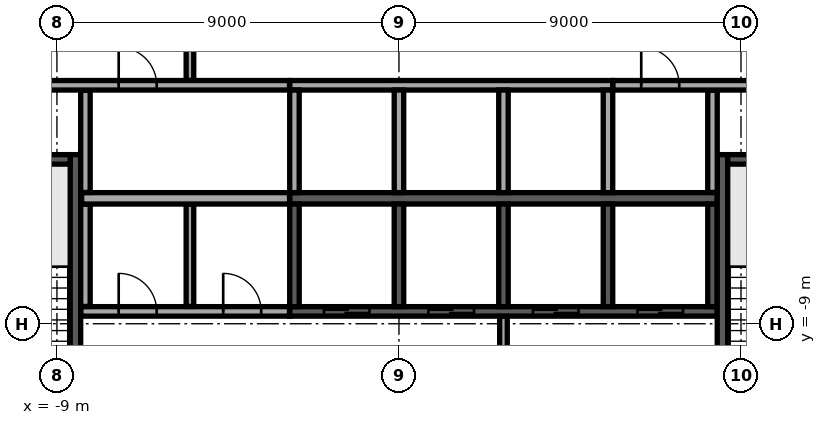
"""IFC4 building model, lengths in metres.
Left out: names, types, materials, properties, quantities, classifications, styles, units other than length and angle.
Written with IfcOpenShell. Run it as: python <this file> out.ifc"""

import sys

from ifc_helpers import new_model, si_unit, direction, frame, frame_2d, origin, place, context, subcontext, project, spatial, rectangle, extrude, element, fill, save


model = new_model("IFC4")
c1 = context("Model", 3, precision=1e-05, world=origin(), true_north=direction((0.0, 1.0)))
c2 = subcontext(c1, "Body", "Model", "MODEL_VIEW")
j1 = project(units=[si_unit("LENGTHUNIT", "METRE"), si_unit("PLANEANGLEUNIT", "RADIAN")], contexts=[c1])
p1 = place(None, origin())
s1 = spatial("IfcSite", under=j1, at=p1, CompositionType="ELEMENT")
p2 = place(p1, origin())
s2 = spatial("IfcBuilding", under=s1, at=p2, CompositionType="ELEMENT")
p3 = place(p2, frame((0.0, 0.0, 193.3)))
s3 = spatial("IfcBuildingStorey", under=s2, at=p3, CompositionType="ELEMENT", Elevation=193.3)
p4 = place(p3, frame((-2.875, -5.7, 0.0), z_axis=(0.0, 0.0, 1.0), x_axis=(1.0, 0.0, 0.0)))
e1 = element("IfcWall", 1, at=p4, inside=s3, PredefinedType="SOLIDWALL", context=c2, shape_type="SweptSolid", body=[
    extrude(rectangle(XDim=11.25, YDim=0.3, at=frame_2d((5.625, 0.0))), origin(), (0.0, 0.0, 1.0), 3.62),
])
p5 = place(p3, frame((-2.875, -2.725, 0.0), z_axis=(0.0, 0.0, 1.0), x_axis=(1.0, 0.0, 0.0)))
e2 = element("IfcWall", 2, at=p5, inside=s3, PredefinedType="SOLIDWALL", context=c2, shape_type="SweptSolid", body=[
    extrude(rectangle(XDim=8.5, YDim=0.25, at=frame_2d((4.25, 0.0))), origin(), (0.0, 0.0, 1.0), 3.62),
])
for number, where, z_axis, x_axis in (
    (3, (-2.75, -5.55, 0.0), (0.0, 0.0, 1.0), (0.0, 1.0, 0.0)),
    (4, (0.0, -5.55, 0.0), (0.0, 0.0, 1.0), (0.0, 1.0, 0.0)),
    (5, (2.75, -5.55, 0.0), (0.0, 0.0, 1.0), (0.0, 1.0, 0.0)),
    (6, (5.5, -5.55, 0.0), (0.0, 0.0, 1.0), (0.0, 1.0, 0.0)),
):
    element("IfcWall", number, at=place(p3, frame(where, z_axis=z_axis, x_axis=x_axis)), inside=s3, PredefinedType="SOLIDWALL", context=c2, shape_type="SweptSolid", body=[
        extrude(rectangle(XDim=2.7, YDim=0.25, at=frame_2d((1.35, 0.0))), origin(), (0.0, 0.0, 1.0), 3.62),
    ])
p6 = place(p3, frame((-2.875, -8.675, 0.0), z_axis=(0.0, 0.0, 1.0), x_axis=(1.0, 0.0, 0.0)))
e7 = element("IfcWall", 7, at=p6, inside=s3, PredefinedType="SOLIDWALL", context=c2, shape_type="SweptSolid", body=[
    extrude(rectangle(XDim=11.25, YDim=0.25, at=frame_2d((5.625, 0.0))), origin(), (0.0, 0.0, 1.0), 3.62),
])
p7 = place(p6, frame((0.9, 0.0, 0.0)))
e8 = element("IfcOpeningElement", 8, at=p7, cuts=e7, PredefinedType="OPENING", context=c2, shape_type="SweptSolid", body=[
    extrude(rectangle(XDim=1.2, YDim=2.1, at=frame_2d((0.6, 1.05))), frame((0.0, 0.135, 0.0), z_axis=(0.0, -1.0, 0.0), x_axis=(1.0, 0.0, 0.0)), (0.0, 0.0, 1.0), 0.27),
])
p8 = place(p6, frame((3.65, 0.0, 0.0)))
e9 = element("IfcOpeningElement", 9, at=p8, cuts=e7, PredefinedType="OPENING", context=c2, shape_type="SweptSolid", body=[
    extrude(rectangle(XDim=1.2, YDim=2.1, at=frame_2d((0.6, 1.05))), frame((0.0, 0.135, 0.0), z_axis=(0.0, -1.0, 0.0), x_axis=(1.0, 0.0, 0.0)), (0.0, 0.0, 1.0), 0.27),
])
p9 = place(p6, frame((6.4, 0.0, 0.0)))
e10 = element("IfcOpeningElement", 10, at=p9, cuts=e7, PredefinedType="OPENING", context=c2, shape_type="SweptSolid", body=[
    extrude(rectangle(XDim=1.2, YDim=2.1, at=frame_2d((0.6, 1.05))), frame((0.0, 0.135, 0.0), z_axis=(0.0, -1.0, 0.0), x_axis=(1.0, 0.0, 0.0)), (0.0, 0.0, 1.0), 0.27),
])
p10 = place(p6, frame((9.15, 0.0, 0.0)))
e11 = element("IfcOpeningElement", 11, at=p10, cuts=e7, PredefinedType="OPENING", context=c2, shape_type="SweptSolid", body=[
    extrude(rectangle(XDim=1.2, YDim=2.1, at=frame_2d((0.6, 1.05))), frame((0.0, 0.135, 0.0), z_axis=(0.0, -1.0, 0.0), x_axis=(1.0, 0.0, 0.0)), (0.0, 0.0, 1.0), 0.27),
])
for number, where, z_axis, x_axis in (
    (12, (-2.75, -8.55, 0.0), (0.0, 0.0, 1.0), (0.0, 1.0, 0.0)),
    (13, (0.0, -8.55, 0.0), (0.0, 0.0, 1.0), (0.0, 1.0, 0.0)),
    (14, (2.75, -8.55, 0.0), (0.0, 0.0, 1.0), (0.0, 1.0, 0.0)),
    (15, (5.5, -8.55, 0.0), (0.0, 0.0, 1.0), (0.0, 1.0, 0.0)),
    (16, (8.25, -8.55, 0.0), (0.0, 0.0, 1.0), (0.0, 1.0, 0.0)),
):
    element("IfcWall", number, at=place(p3, frame(where, z_axis=z_axis, x_axis=x_axis)), inside=s3, PredefinedType="SOLIDWALL", context=c2, shape_type="SweptSolid", body=[
        extrude(rectangle(XDim=2.7, YDim=0.25, at=frame_2d((1.35, 0.0))), origin(), (0.0, 0.0, 1.0), 3.62),
    ])
p11 = place(p3, frame((-8.512, -4.55, 0.0), z_axis=(0.0, 0.0, 1.0), x_axis=(0.0, -1.0, 0.0)))
e17 = element("IfcWall", 17, at=p11, inside=s3, PredefinedType="SOLIDWALL", context=c2, shape_type="SweptSolid", body=[
    extrude(rectangle(XDim=7.25, YDim=0.275, at=frame_2d((3.625, 0.0))), origin(), (0.0, 0.0, 1.0), 3.62),
])
p12 = place(p11, frame((6.0, 0.0, 0.0)))
e18 = element("IfcOpeningElement", 18, at=p12, cuts=e17, PredefinedType="OPENING", context=c2, shape_type="SweptSolid", body=[
    extrude(rectangle(XDim=1.0, YDim=2.1, at=frame_2d((0.5, 1.05))), frame((0.0, 0.147, 0.0), z_axis=(0.0, -1.0, 0.0), x_axis=(1.0, 0.0, 0.0)), (0.0, 0.0, 1.0), 0.295),
])
p13 = place(p3, frame((-8.65, -4.675, 0.0), z_axis=(0.0, 0.0, 1.0), x_axis=(-1.0, 0.0, 0.0)))
e19 = element("IfcWall", 19, at=p13, inside=s3, PredefinedType="SOLIDWALL", context=c2, shape_type="SweptSolid", body=[
    extrude(rectangle(XDim=3.15, YDim=0.25, at=frame_2d((1.575, 0.0))), origin(), (0.0, 0.0, 1.0), 3.62),
])
p14 = place(p3, frame((8.512, -4.55, 0.0), z_axis=(0.0, 0.0, 1.0), x_axis=(0.0, -1.0, 0.0)))
e20 = element("IfcWall", 20, at=p14, inside=s3, PredefinedType="SOLIDWALL", context=c2, shape_type="SweptSolid", body=[
    extrude(rectangle(XDim=7.25, YDim=0.275, at=frame_2d((3.625, 0.0))), origin(), (0.0, 0.0, 1.0), 3.62),
])
p15 = place(p14, frame((6.0, 0.0, 0.0)))
e21 = element("IfcOpeningElement", 21, at=p15, cuts=e20, PredefinedType="OPENING", context=c2, shape_type="SweptSolid", body=[
    extrude(rectangle(XDim=1.0, YDim=2.1, at=frame_2d((0.5, 1.05))), frame((0.0, 0.147, 0.0), z_axis=(0.0, -1.0, 0.0), x_axis=(1.0, 0.0, 0.0)), (0.0, 0.0, 1.0), 0.295),
])
p16 = place(p3, frame((8.65, -4.675, 0.0), z_axis=(0.0, 0.0, 1.0), x_axis=(1.0, 0.0, 0.0)))
e22 = element("IfcWall", 22, at=p16, inside=s3, PredefinedType="SOLIDWALL", context=c2, shape_type="SweptSolid", body=[
    extrude(rectangle(XDim=3.15, YDim=0.25, at=frame_2d((1.575, 0.0))), origin(), (0.0, 0.0, 1.0), 3.62),
])
p17 = place(p3, frame((2.75, -11.795, 0.0), z_axis=(0.0, 0.0, 1.0), x_axis=(0.0, 1.0, 0.0)))
e23 = element("IfcWall", 23, at=p17, inside=s3, PredefinedType="PARTITIONING", context=c2, shape_type="SweptSolid", body=[
    extrude(rectangle(XDim=2.99, YDim=0.2, at=frame_2d((1.495, 0.0))), origin(), (0.0, 0.0, 1.0), 3.62),
])
p18 = place(p3, frame((-8.37, -8.675, 0.0), z_axis=(0.0, 0.0, 1.0), x_axis=(1.0, 0.0, 0.0)))
e24 = element("IfcWall", 24, at=p18, inside=s3, PredefinedType="PARTITIONING", context=c2, shape_type="SweptSolid", body=[
    extrude(rectangle(XDim=5.49, YDim=0.25, at=frame_2d((2.745, 0.0))), origin(), (0.0, 0.0, 1.0), 3.62),
])
p19 = place(p18, frame((0.995, 0.0, 0.0)))
e25 = element("IfcOpeningElement", 25, at=p19, cuts=e24, PredefinedType="OPENING", context=c2, shape_type="SweptSolid", body=[
    extrude(rectangle(XDim=1.0, YDim=2.1, at=frame_2d((0.5, 1.05))), frame((0.0, 0.135, 0.0), z_axis=(0.0, -1.0, 0.0), x_axis=(1.0, 0.0, 0.0)), (0.0, 0.0, 1.0), 0.27),
])
p20 = place(p18, frame((3.745, 0.0, 0.0)))
e26 = element("IfcOpeningElement", 26, at=p20, cuts=e24, PredefinedType="OPENING", context=c2, shape_type="SweptSolid", body=[
    extrude(rectangle(XDim=1.0, YDim=2.1, at=frame_2d((0.5, 1.05))), frame((0.0, 0.135, 0.0), z_axis=(0.0, -1.0, 0.0), x_axis=(1.0, 0.0, 0.0)), (0.0, 0.0, 1.0), 0.27),
])
p21 = place(p3, frame((-8.25, -8.545, 0.0), z_axis=(0.0, 0.0, 1.0), x_axis=(0.0, 1.0, 0.0)))
e27 = element("IfcWall", 27, at=p21, inside=s3, PredefinedType="PARTITIONING", context=c2, shape_type="SweptSolid", body=[
    extrude(rectangle(XDim=2.69, YDim=0.25, at=frame_2d((1.345, 0.0))), origin(), (0.0, 0.0, 1.0), 3.62),
])
p22 = place(p3, frame((-5.5, -8.545, 0.0), z_axis=(0.0, 0.0, 1.0), x_axis=(0.0, 1.0, 0.0)))
e28 = element("IfcWall", 28, at=p22, inside=s3, PredefinedType="PARTITIONING", context=c2, shape_type="SweptSolid", body=[
    extrude(rectangle(XDim=2.69, YDim=0.2, at=frame_2d((1.345, 0.0))), origin(), (0.0, 0.0, 1.0), 3.62),
])
p23 = place(p3, frame((-8.35, -5.7, 0.0), z_axis=(0.0, 0.0, 1.0), x_axis=(1.0, 0.0, 0.0)))
e29 = element("IfcWall", 29, at=p23, inside=s3, PredefinedType="PARTITIONING", context=c2, shape_type="SweptSolid", body=[
    extrude(rectangle(XDim=5.47, YDim=0.3, at=frame_2d((2.735, 0.0))), origin(), (0.0, 0.0, 1.0), 3.62),
])
for number, where, z_axis, x_axis in (
    (30, (-8.25, -5.545, 0.0), (0.0, 0.0, 1.0), (0.0, 1.0, 0.0)),
    (31, (8.25, -5.545, 0.0), (0.0, 0.0, 1.0), (0.0, 1.0, 0.0)),
):
    element("IfcWall", number, at=place(p3, frame(where, z_axis=z_axis, x_axis=x_axis)), inside=s3, PredefinedType="PARTITIONING", context=c2, shape_type="SweptSolid", body=[
        extrude(rectangle(XDim=2.69, YDim=0.25, at=frame_2d((1.345, 0.0))), origin(), (0.0, 0.0, 1.0), 3.62),
    ])
p24 = place(p3, frame((-11.795, -2.725, 0.0), z_axis=(0.0, 0.0, 1.0), x_axis=(1.0, 0.0, 0.0)))
e32 = element("IfcWall", 32, at=p24, inside=s3, PredefinedType="PARTITIONING", context=c2, shape_type="SweptSolid", body=[
    extrude(rectangle(XDim=8.915, YDim=0.25, at=frame_2d((4.458, 0.0))), origin(), (0.0, 0.0, 1.0), 3.62),
])
p25 = place(p24, frame((1.295, 0.0, 0.0)))
e33 = element("IfcOpeningElement", 33, at=p25, cuts=e32, PredefinedType="OPENING", context=c2, shape_type="SweptSolid", body=[
    extrude(rectangle(XDim=1.0, YDim=2.1, at=frame_2d((0.5, 1.05))), frame((0.0, 0.135, 0.0), z_axis=(0.0, -1.0, 0.0), x_axis=(1.0, 0.0, 0.0)), (0.0, 0.0, 1.0), 0.27),
])
p26 = place(p24, frame((4.42, 0.0, 0.0)))
e34 = element("IfcOpeningElement", 34, at=p26, cuts=e32, PredefinedType="OPENING", context=c2, shape_type="SweptSolid", body=[
    extrude(rectangle(XDim=1.0, YDim=2.1, at=frame_2d((0.5, 1.05))), frame((0.0, 0.135, 0.0), z_axis=(0.0, -1.0, 0.0), x_axis=(1.0, 0.0, 0.0)), (0.0, 0.0, 1.0), 0.27),
])
p27 = place(p3, frame((5.63, -2.725, 0.0), z_axis=(0.0, 0.0, 1.0), x_axis=(1.0, 0.0, 0.0)))
e35 = element("IfcWall", 35, at=p27, inside=s3, PredefinedType="PARTITIONING", context=c2, shape_type="SweptSolid", body=[
    extrude(rectangle(XDim=6.165, YDim=0.25, at=frame_2d((3.083, 0.0))), origin(), (0.0, 0.0, 1.0), 3.62),
])
p28 = place(p27, frame((0.745, 0.0, 0.0)))
e36 = element("IfcOpeningElement", 36, at=p28, cuts=e35, PredefinedType="OPENING", context=c2, shape_type="SweptSolid", body=[
    extrude(rectangle(XDim=1.0, YDim=2.1, at=frame_2d((0.5, 1.05))), frame((0.0, 0.135, 0.0), z_axis=(0.0, -1.0, 0.0), x_axis=(1.0, 0.0, 0.0)), (0.0, 0.0, 1.0), 0.27),
])
p29 = place(p27, frame((3.92, 0.0, 0.0)))
e37 = element("IfcOpeningElement", 37, at=p29, cuts=e35, PredefinedType="OPENING", context=c2, shape_type="SweptSolid", body=[
    extrude(rectangle(XDim=0.9, YDim=2.1, at=frame_2d((0.45, 1.05))), frame((0.0, 0.135, 0.0), z_axis=(0.0, -1.0, 0.0), x_axis=(1.0, 0.0, 0.0)), (0.0, 0.0, 1.0), 0.27),
])
p30 = place(p3, frame((-5.5, -2.595, 0.0), z_axis=(0.0, 0.0, 1.0), x_axis=(0.0, 1.0, 0.0)))
e38 = element("IfcWall", 38, at=p30, inside=s3, PredefinedType="PARTITIONING", context=c2, shape_type="SweptSolid", body=[
    extrude(rectangle(XDim=5.19, YDim=0.2, at=frame_2d((2.595, 0.0))), origin(), (0.0, 0.0, 1.0), 3.62),
])
p31 = place(p30, frame((1.395, 0.0, 0.0)))
e39 = element("IfcOpeningElement", 39, at=p31, cuts=e38, PredefinedType="OPENING", context=c2, shape_type="SweptSolid", body=[
    extrude(rectangle(XDim=2.4, YDim=2.4, at=frame_2d((1.2, 1.2))), frame((0.0, 0.11, 0.0), z_axis=(0.0, -1.0, 0.0), x_axis=(1.0, 0.0, 0.0)), (0.0, 0.0, 1.0), 0.22),
])
p32 = place(p3, frame((-2.286, -34.715, 0.0), z_axis=(0.0, 0.0, 1.0), x_axis=(0.754708272811, 0.656060532993, 0.0)))
e40 = element("IfcWall", 40, at=p32, inside=s3, PredefinedType="STANDARD", context=c2, shape_type="SweptSolid", body=[
    extrude(rectangle(XDim=49.0, YDim=0.6, at=frame_2d((24.5, 0.0))), origin(), (0.0, 0.0, 1.0), 3.62),
])
p33 = place(p32, frame((1.227, 0.0, 0.9)))
e41 = element("IfcOpeningElement", 41, at=p33, cuts=e40, PredefinedType="OPENING", context=c2, shape_type="SweptSolid", body=[
    extrude(rectangle(XDim=2.0, YDim=2.1, at=frame_2d((1.0, 1.05))), frame((0.0, 0.31, 0.0), z_axis=(0.0, -1.0, 0.0), x_axis=(1.0, 0.0, 0.0)), (0.0, 0.0, 1.0), 0.62),
])
p34 = place(p32, frame((5.682, 0.0, 0.9)))
e42 = element("IfcOpeningElement", 42, at=p34, cuts=e40, PredefinedType="OPENING", context=c2, shape_type="SweptSolid", body=[
    extrude(rectangle(XDim=2.0, YDim=2.1, at=frame_2d((1.0, 1.05))), frame((0.0, 0.31, 0.0), z_axis=(0.0, -1.0, 0.0), x_axis=(1.0, 0.0, 0.0)), (0.0, 0.0, 1.0), 0.62),
])
p35 = place(p32, frame((10.136, 0.0, 0.9)))
e43 = element("IfcOpeningElement", 43, at=p35, cuts=e40, PredefinedType="OPENING", context=c2, shape_type="SweptSolid", body=[
    extrude(rectangle(XDim=2.0, YDim=2.1, at=frame_2d((1.0, 1.05))), frame((0.0, 0.31, 0.0), z_axis=(0.0, -1.0, 0.0), x_axis=(1.0, 0.0, 0.0)), (0.0, 0.0, 1.0), 0.62),
])
p36 = place(p32, frame((14.591, 0.0, 0.9)))
e44 = element("IfcOpeningElement", 44, at=p36, cuts=e40, PredefinedType="OPENING", context=c2, shape_type="SweptSolid", body=[
    extrude(rectangle(XDim=2.0, YDim=2.1, at=frame_2d((1.0, 1.05))), frame((0.0, 0.31, 0.0), z_axis=(0.0, -1.0, 0.0), x_axis=(1.0, 0.0, 0.0)), (0.0, 0.0, 1.0), 0.62),
])
p37 = place(p32, frame((19.045, 0.0, 0.9)))
e45 = element("IfcOpeningElement", 45, at=p37, cuts=e40, PredefinedType="OPENING", context=c2, shape_type="SweptSolid", body=[
    extrude(rectangle(XDim=2.0, YDim=2.1, at=frame_2d((1.0, 1.05))), frame((0.0, 0.31, 0.0), z_axis=(0.0, -1.0, 0.0), x_axis=(1.0, 0.0, 0.0)), (0.0, 0.0, 1.0), 0.62),
])
p38 = place(p32, frame((23.5, 0.0, 0.9)))
e46 = element("IfcOpeningElement", 46, at=p38, cuts=e40, PredefinedType="OPENING", context=c2, shape_type="SweptSolid", body=[
    extrude(rectangle(XDim=2.0, YDim=2.1, at=frame_2d((1.0, 1.05))), frame((0.0, 0.31, 0.0), z_axis=(0.0, -1.0, 0.0), x_axis=(1.0, 0.0, 0.0)), (0.0, 0.0, 1.0), 0.62),
])
p39 = place(p32, frame((27.955, 0.0, 0.9)))
e47 = element("IfcOpeningElement", 47, at=p39, cuts=e40, PredefinedType="OPENING", context=c2, shape_type="SweptSolid", body=[
    extrude(rectangle(XDim=2.0, YDim=2.1, at=frame_2d((1.0, 1.05))), frame((0.0, 0.31, 0.0), z_axis=(0.0, -1.0, 0.0), x_axis=(1.0, 0.0, 0.0)), (0.0, 0.0, 1.0), 0.62),
])
p40 = place(p32, frame((32.409, 0.0, 0.9)))
e48 = element("IfcOpeningElement", 48, at=p40, cuts=e40, PredefinedType="OPENING", context=c2, shape_type="SweptSolid", body=[
    extrude(rectangle(XDim=2.0, YDim=2.1, at=frame_2d((1.0, 1.05))), frame((0.0, 0.31, 0.0), z_axis=(0.0, -1.0, 0.0), x_axis=(1.0, 0.0, 0.0)), (0.0, 0.0, 1.0), 0.62),
])
p41 = place(p32, frame((36.864, 0.0, 0.9)))
e49 = element("IfcOpeningElement", 49, at=p41, cuts=e40, PredefinedType="OPENING", context=c2, shape_type="SweptSolid", body=[
    extrude(rectangle(XDim=2.0, YDim=2.1, at=frame_2d((1.0, 1.05))), frame((0.0, 0.31, 0.0), z_axis=(0.0, -1.0, 0.0), x_axis=(1.0, 0.0, 0.0)), (0.0, 0.0, 1.0), 0.62),
])
p42 = place(p32, frame((41.318, 0.0, 0.9)))
e50 = element("IfcOpeningElement", 50, at=p42, cuts=e40, PredefinedType="OPENING", context=c2, shape_type="SweptSolid", body=[
    extrude(rectangle(XDim=2.0, YDim=2.1, at=frame_2d((1.0, 1.05))), frame((0.0, 0.31, 0.0), z_axis=(0.0, -1.0, 0.0), x_axis=(1.0, 0.0, 0.0)), (0.0, 0.0, 1.0), 0.62),
])
p43 = place(p32, frame((45.773, 0.0, 0.9)))
e51 = element("IfcOpeningElement", 51, at=p43, cuts=e40, PredefinedType="OPENING", context=c2, shape_type="SweptSolid", body=[
    extrude(rectangle(XDim=2.0, YDim=2.1, at=frame_2d((1.0, 1.05))), frame((0.0, 0.31, 0.0), z_axis=(0.0, -1.0, 0.0), x_axis=(1.0, 0.0, 0.0)), (0.0, 0.0, 1.0), 0.62),
])
p44 = place(p3, frame((-24.98, -4.673, 0.0), z_axis=(0.0, 0.0, 1.0), x_axis=(0.656048444225, -0.754718781289, 0.0)))
e52 = element("IfcWall", 52, at=p44, inside=s3, PredefinedType="PARTITIONING", context=c2, shape_type="SweptSolid", body=[
    extrude(rectangle(XDim=25.8, YDim=0.15, at=frame_2d((12.9, 0.0))), origin(), (0.0, 0.0, 1.0), 3.17),
])
p45 = place(p44, frame((12.071, 0.0, 0.0)))
e53 = element("IfcOpeningElement", 53, at=p45, cuts=e52, PredefinedType="OPENING", context=c2, shape_type="SweptSolid", body=[
    extrude(rectangle(XDim=1.0, YDim=2.1, at=frame_2d((0.5, 1.05))), frame((0.0, 0.085, 0.0), z_axis=(0.0, -1.0, 0.0), x_axis=(1.0, 0.0, 0.0)), (0.0, 0.0, 1.0), 0.17),
])
p46 = place(p44, frame((24.318, 0.0, 0.0)))
e54 = element("IfcOpeningElement", 54, at=p46, cuts=e52, PredefinedType="OPENING", context=c2, shape_type="SweptSolid", body=[
    extrude(rectangle(XDim=1.0, YDim=2.1, at=frame_2d((0.5, 1.05))), frame((0.0, 0.085, 0.0), z_axis=(0.0, -1.0, 0.0), x_axis=(1.0, 0.0, 0.0)), (0.0, 0.0, 1.0), 0.17),
])
p47 = place(p3, frame((-1.0, -26.268, 0.0), z_axis=(0.0, 0.0, 1.0), x_axis=(0.754711356604, 0.656056985492, 0.0)))
e55 = element("IfcWall", 55, at=p47, inside=s3, PredefinedType="PARTITIONING", context=c2, shape_type="SweptSolid", body=[
    extrude(rectangle(XDim=36.052, YDim=0.15, at=frame_2d((18.026, 0.0))), origin(), (0.0, 0.0, 1.0), 3.17),
])
p48 = place(p47, frame((9.598, 0.0, 0.0)))
e56 = element("IfcOpeningElement", 56, at=p48, cuts=e55, PredefinedType="OPENING", context=c2, shape_type="SweptSolid", body=[
    extrude(rectangle(XDim=1.0, YDim=2.1, at=frame_2d((0.5, 1.05))), frame((0.0, 0.085, 0.0), z_axis=(0.0, -1.0, 0.0), x_axis=(1.0, 0.0, 0.0)), (0.0, 0.0, 1.0), 0.17),
])
p49 = place(p47, frame((20.957, 0.0, 0.0)))
e57 = element("IfcOpeningElement", 57, at=p49, cuts=e55, PredefinedType="OPENING", context=c2, shape_type="SweptSolid", body=[
    extrude(rectangle(XDim=1.0, YDim=2.1, at=frame_2d((0.5, 1.05))), frame((0.0, 0.085, 0.0), z_axis=(0.0, -1.0, 0.0), x_axis=(1.0, 0.0, 0.0)), (0.0, 0.0, 1.0), 0.17),
])
p50 = place(p47, frame((27.87, 0.0, 0.0)))
e58 = element("IfcOpeningElement", 58, at=p50, cuts=e55, PredefinedType="OPENING", context=c2, shape_type="SweptSolid", body=[
    extrude(rectangle(XDim=1.8, YDim=2.1, at=frame_2d((0.9, 1.05))), frame((0.0, 0.085, 0.0), z_axis=(0.0, -1.0, 0.0), x_axis=(1.0, 0.0, 0.0)), (0.0, 0.0, 1.0), 0.17),
])
p51 = place(p7, origin())
e59 = element("IfcDoor", 59, at=p51, inside=s3, OperationType="DOUBLE_DOOR_SLIDING", PredefinedType="DOOR", context=c2, shape_type="SweptSolid", body=[
    extrude(rectangle(XDim=1.2, YDim=2.1, at=frame_2d((0.6, 1.05))), frame((0.0, 0.025, 0.0), z_axis=(0.0, -1.0, 0.0), x_axis=(1.0, 0.0, 0.0)), (0.0, 0.0, 1.0), 0.05),
])
fill(e8, e59)
p52 = place(p8, origin())
e60 = element("IfcDoor", 60, at=p52, inside=s3, OperationType="DOUBLE_DOOR_SLIDING", PredefinedType="DOOR", context=c2, shape_type="SweptSolid", body=[
    extrude(rectangle(XDim=1.2, YDim=2.1, at=frame_2d((0.6, 1.05))), frame((0.0, 0.025, 0.0), z_axis=(0.0, -1.0, 0.0), x_axis=(1.0, 0.0, 0.0)), (0.0, 0.0, 1.0), 0.05),
])
fill(e9, e60)
p53 = place(p9, origin())
e61 = element("IfcDoor", 61, at=p53, inside=s3, OperationType="DOUBLE_DOOR_SLIDING", PredefinedType="DOOR", context=c2, shape_type="SweptSolid", body=[
    extrude(rectangle(XDim=1.2, YDim=2.1, at=frame_2d((0.6, 1.05))), frame((0.0, 0.025, 0.0), z_axis=(0.0, -1.0, 0.0), x_axis=(1.0, 0.0, 0.0)), (0.0, 0.0, 1.0), 0.05),
])
fill(e10, e61)
p54 = place(p10, origin())
e62 = element("IfcDoor", 62, at=p54, inside=s3, OperationType="DOUBLE_DOOR_SLIDING", PredefinedType="DOOR", context=c2, shape_type="SweptSolid", body=[
    extrude(rectangle(XDim=1.2, YDim=2.1, at=frame_2d((0.6, 1.05))), frame((0.0, 0.025, 0.0), z_axis=(0.0, -1.0, 0.0), x_axis=(1.0, 0.0, 0.0)), (0.0, 0.0, 1.0), 0.05),
])
fill(e11, e62)
p55 = place(p19, origin())
e63 = element("IfcDoor", 63, at=p55, inside=s3, OperationType="SINGLE_SWING_RIGHT", PredefinedType="DOOR", context=c2, shape_type="SweptSolid", body=[
    extrude(rectangle(XDim=1.0, YDim=2.1, at=frame_2d((0.5, 1.05))), frame((0.0, 0.025, 0.0), z_axis=(0.0, -1.0, 0.0), x_axis=(1.0, 0.0, 0.0)), (0.0, 0.0, 1.0), 0.05),
])
fill(e25, e63)
p56 = place(p20, origin())
e64 = element("IfcDoor", 64, at=p56, inside=s3, OperationType="SINGLE_SWING_RIGHT", PredefinedType="DOOR", context=c2, shape_type="SweptSolid", body=[
    extrude(rectangle(XDim=1.0, YDim=2.1, at=frame_2d((0.5, 1.05))), frame((0.0, 0.025, 0.0), z_axis=(0.0, -1.0, 0.0), x_axis=(1.0, 0.0, 0.0)), (0.0, 0.0, 1.0), 0.05),
])
fill(e26, e64)
p57 = place(p28, origin())
e65 = element("IfcDoor", 65, at=p57, inside=s3, OperationType="SINGLE_SWING_RIGHT", PredefinedType="DOOR", context=c2, shape_type="SweptSolid", body=[
    extrude(rectangle(XDim=1.0, YDim=2.1, at=frame_2d((0.5, 1.05))), frame((0.0, 0.025, 0.0), z_axis=(0.0, -1.0, 0.0), x_axis=(1.0, 0.0, 0.0)), (0.0, 0.0, 1.0), 0.05),
])
fill(e36, e65)
p58 = place(p26, origin())
e66 = element("IfcDoor", 66, at=p58, inside=s3, OperationType="SINGLE_SWING_RIGHT", PredefinedType="DOOR", context=c2, shape_type="SweptSolid", body=[
    extrude(rectangle(XDim=1.0, YDim=2.1, at=frame_2d((0.5, 1.05))), frame((0.0, 0.025, 0.0), z_axis=(0.0, -1.0, 0.0), x_axis=(1.0, 0.0, 0.0)), (0.0, 0.0, 1.0), 0.05),
])
fill(e34, e66)
save(model, sys.argv[1])
